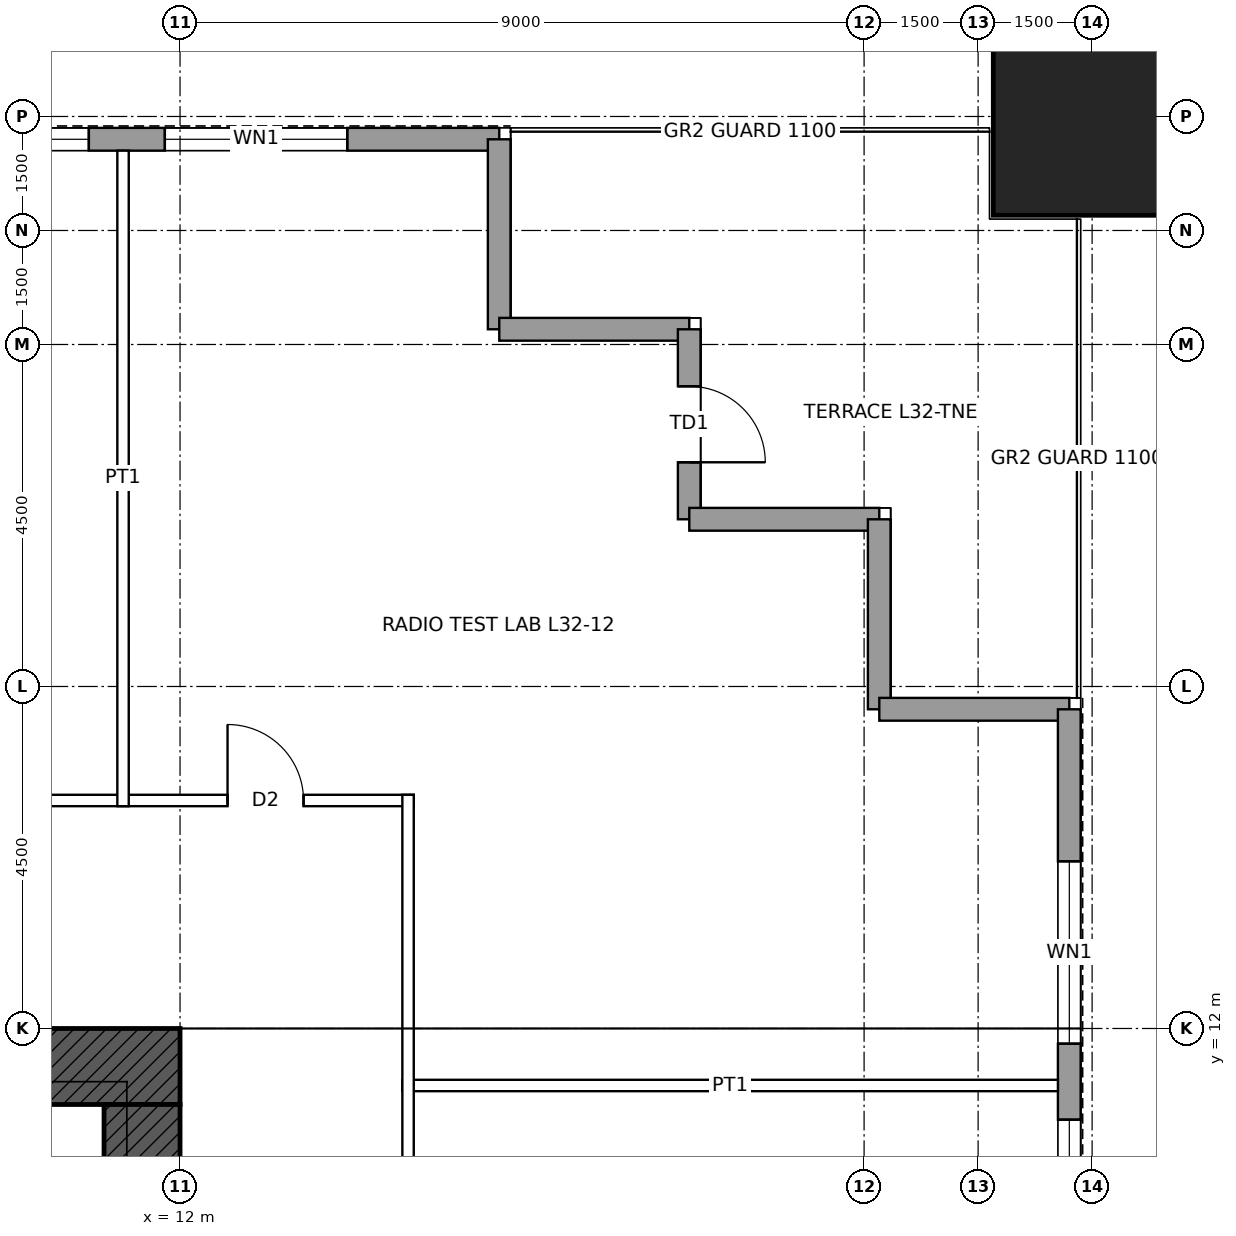
"""IFC4 building model, lengths in metres.
Left out: names, types, materials, properties, quantities, classifications, styles, units other than length and angle.
Written with IfcOpenShell. Run it as: python <this file> out.ifc"""

import sys

from ifc_helpers import new_model, si_unit, direction, frame, frame_2d, origin, origin_2d, place, context, subcontext, project, spatial, rectangle, hollow_rectangle, extrude, element, fill, save


model = new_model("IFC4")
c1 = context("Model", 3, precision=1e-05, world=origin(), true_north=direction((0.0, 1.0)))
c2 = subcontext(c1, "Body", "Model", "MODEL_VIEW")
j1 = project(units=[si_unit("LENGTHUNIT", "METRE"), si_unit("PLANEANGLEUNIT", "RADIAN")], contexts=[c1])
p1 = place(None, origin())
s1 = spatial("IfcSite", under=j1, at=p1, CompositionType="ELEMENT")
p2 = place(p1, origin())
s2 = spatial("IfcBuilding", under=s1, at=p2, CompositionType="ELEMENT")
p3 = place(p2, frame((0.0, 0.0, 158.4)))
s3 = spatial("IfcBuildingStorey", under=s2, at=p3, CompositionType="ELEMENT", Elevation=158.4)
p4 = place(p3, frame((24.0, 24.0, 0.0), z_axis=(0.0, 0.0, 1.0), x_axis=(1.0, 0.0, 0.0)))
e1 = element("IfcColumn", 1, at=p4, inside=s3, PredefinedType="COLUMN", context=c2, shape_type="SweptSolid", body=[
    extrude(hollow_rectangle(XDim=2.6, YDim=2.6, WallThickness=0.13, at=origin_2d()), origin(), (0.0, 0.0, 1.0), 4.5),
])
p5 = place(p3, frame((-12.0, 11.5, 0.0), z_axis=(0.0, 0.0, 1.0), x_axis=(1.0, 0.0, 0.0)))
e2 = element("IfcWall", 2, at=p5, inside=s3, PredefinedType="SHEAR", context=c2, shape_type="SweptSolid", body=[
    extrude(rectangle(XDim=24.0, YDim=1.0, at=frame_2d((12.0, 0.0))), origin(), (0.0, 0.0, 1.0), 4.5),
])
p6 = place(p5, frame((6.25, 0.0, 0.0)))
e3 = element("IfcOpeningElement", 3, at=p6, cuts=e2, PredefinedType="OPENING", context=c2, shape_type="SweptSolid", body=[
    extrude(rectangle(XDim=1.0, YDim=2.4, at=frame_2d((0.5, 1.2))), frame((0.0, 0.51, 0.0), z_axis=(0.0, -1.0, 0.0), x_axis=(1.0, 0.0, 0.0)), (0.0, 0.0, 1.0), 1.02),
])
p7 = place(p5, frame((16.75, 0.0, 0.0)))
e4 = element("IfcOpeningElement", 4, at=p7, cuts=e2, PredefinedType="OPENING", context=c2, shape_type="SweptSolid", body=[
    extrude(rectangle(XDim=1.0, YDim=2.4, at=frame_2d((0.5, 1.2))), frame((0.0, 0.51, 0.0), z_axis=(0.0, -1.0, 0.0), x_axis=(1.0, 0.0, 0.0)), (0.0, 0.0, 1.0), 1.02),
])
p8 = place(p3, frame((11.5, 11.0, 0.0), z_axis=(0.0, 0.0, 1.0), x_axis=(0.0, -1.0, 0.0)))
e5 = element("IfcWall", 5, at=p8, inside=s3, PredefinedType="SHEAR", context=c2, shape_type="SweptSolid", body=[
    extrude(rectangle(XDim=22.0, YDim=1.0, at=frame_2d((11.0, 0.0))), origin(), (0.0, 0.0, 1.0), 4.5),
])
p9 = place(p8, frame((10.5, 0.0, 0.0)))
e6 = element("IfcOpeningElement", 6, at=p9, cuts=e5, PredefinedType="OPENING", context=c2, shape_type="SweptSolid", body=[
    extrude(rectangle(XDim=1.0, YDim=2.4, at=frame_2d((0.5, 1.2))), frame((0.0, 0.51, 0.0), z_axis=(0.0, -1.0, 0.0), x_axis=(1.0, 0.0, 0.0)), (0.0, 0.0, 1.0), 1.02),
])
p10 = place(p3, frame((-16.2, 23.7, 0.0), z_axis=(0.0, 0.0, 1.0), x_axis=(1.0, 0.0, 0.0)))
e7 = element("IfcWall", 7, at=p10, inside=s3, PredefinedType="SOLIDWALL", context=c2, shape_type="SweptSolid", body=[
    extrude(rectangle(XDim=32.4, YDim=0.3, at=frame_2d((16.2, 0.0))), origin(), (0.0, 0.0, 1.0), 4.3),
])
p11 = place(p10, frame((2.0, 0.0, 1.0)))
e8 = element("IfcOpeningElement", 8, at=p11, cuts=e7, PredefinedType="OPENING", context=c2, shape_type="SweptSolid", body=[
    extrude(rectangle(XDim=2.4, YDim=1.2, at=frame_2d((1.2, 0.6))), frame((0.0, 0.16, 0.0), z_axis=(0.0, -1.0, 0.0), x_axis=(1.0, 0.0, 0.0)), (0.0, 0.0, 1.0), 0.32),
])
p12 = place(p10, frame((5.4, 0.0, 1.0)))
e9 = element("IfcOpeningElement", 9, at=p12, cuts=e7, PredefinedType="OPENING", context=c2, shape_type="SweptSolid", body=[
    extrude(rectangle(XDim=2.4, YDim=1.2, at=frame_2d((1.2, 0.6))), frame((0.0, 0.16, 0.0), z_axis=(0.0, -1.0, 0.0), x_axis=(1.0, 0.0, 0.0)), (0.0, 0.0, 1.0), 0.32),
])
p13 = place(p10, frame((10.45, 0.0, 1.0)))
e10 = element("IfcOpeningElement", 10, at=p13, cuts=e7, PredefinedType="OPENING", context=c2, shape_type="SweptSolid", body=[
    extrude(rectangle(XDim=2.4, YDim=1.2, at=frame_2d((1.2, 0.6))), frame((0.0, 0.16, 0.0), z_axis=(0.0, -1.0, 0.0), x_axis=(1.0, 0.0, 0.0)), (0.0, 0.0, 1.0), 0.32),
])
p14 = place(p10, frame((13.15, 0.0, 1.0)))
e11 = element("IfcOpeningElement", 11, at=p14, cuts=e7, PredefinedType="OPENING", context=c2, shape_type="SweptSolid", body=[
    extrude(rectangle(XDim=2.4, YDim=1.2, at=frame_2d((1.2, 0.6))), frame((0.0, 0.16, 0.0), z_axis=(0.0, -1.0, 0.0), x_axis=(1.0, 0.0, 0.0)), (0.0, 0.0, 1.0), 0.32),
])
p15 = place(p10, frame((16.85, 0.0, 1.0)))
e12 = element("IfcOpeningElement", 12, at=p15, cuts=e7, PredefinedType="OPENING", context=c2, shape_type="SweptSolid", body=[
    extrude(rectangle(XDim=2.4, YDim=1.2, at=frame_2d((1.2, 0.6))), frame((0.0, 0.16, 0.0), z_axis=(0.0, -1.0, 0.0), x_axis=(1.0, 0.0, 0.0)), (0.0, 0.0, 1.0), 0.32),
])
p16 = place(p10, frame((19.55, 0.0, 1.0)))
e13 = element("IfcOpeningElement", 13, at=p16, cuts=e7, PredefinedType="OPENING", context=c2, shape_type="SweptSolid", body=[
    extrude(rectangle(XDim=2.4, YDim=1.2, at=frame_2d((1.2, 0.6))), frame((0.0, 0.16, 0.0), z_axis=(0.0, -1.0, 0.0), x_axis=(1.0, 0.0, 0.0)), (0.0, 0.0, 1.0), 0.32),
])
p17 = place(p10, frame((24.6, 0.0, 1.0)))
e14 = element("IfcOpeningElement", 14, at=p17, cuts=e7, PredefinedType="OPENING", context=c2, shape_type="SweptSolid", body=[
    extrude(rectangle(XDim=2.4, YDim=1.2, at=frame_2d((1.2, 0.6))), frame((0.0, 0.16, 0.0), z_axis=(0.0, -1.0, 0.0), x_axis=(1.0, 0.0, 0.0)), (0.0, 0.0, 1.0), 0.32),
])
p18 = place(p10, frame((28.0, 0.0, 1.0)))
e15 = element("IfcOpeningElement", 15, at=p18, cuts=e7, PredefinedType="OPENING", context=c2, shape_type="SweptSolid", body=[
    extrude(rectangle(XDim=2.4, YDim=1.2, at=frame_2d((1.2, 0.6))), frame((0.0, 0.16, 0.0), z_axis=(0.0, -1.0, 0.0), x_axis=(1.0, 0.0, 0.0)), (0.0, 0.0, 1.0), 0.32),
])
for number, where, z_axis, x_axis in (
    (16, (16.2, 23.7, 0.0), (0.0, 0.0, 1.0), (0.0, -1.0, 0.0)),
    (17, (16.2, 21.2, 0.0), (0.0, 0.0, 1.0), (1.0, 0.0, 0.0)),
):
    element("IfcWall", number, at=place(p3, frame(where, z_axis=z_axis, x_axis=x_axis)), inside=s3, PredefinedType="SOLIDWALL", context=c2, shape_type="SweptSolid", body=[
        extrude(rectangle(XDim=2.5, YDim=0.3, at=frame_2d((1.25, 0.0))), origin(), (0.0, 0.0, 1.0), 4.3),
    ])
p19 = place(p3, frame((18.7, 21.2, 0.0), z_axis=(0.0, 0.0, 1.0), x_axis=(0.0, -1.0, 0.0)))
e18 = element("IfcWall", 18, at=p19, inside=s3, PredefinedType="SOLIDWALL", context=c2, shape_type="SweptSolid", body=[
    extrude(rectangle(XDim=2.5, YDim=0.3, at=frame_2d((1.25, 0.0))), origin(), (0.0, 0.0, 1.0), 4.3),
])
p20 = place(p19, frame((0.75, 0.0, 0.0)))
e19 = element("IfcOpeningElement", 19, at=p20, cuts=e18, PredefinedType="OPENING", context=c2, shape_type="SweptSolid", body=[
    extrude(rectangle(XDim=1.0, YDim=2.4, at=frame_2d((0.5, 1.2))), frame((0.0, 0.16, 0.0), z_axis=(0.0, -1.0, 0.0), x_axis=(1.0, 0.0, 0.0)), (0.0, 0.0, 1.0), 0.32),
])
for number, where, z_axis, x_axis in (
    (20, (18.7, 18.7, 0.0), (0.0, 0.0, 1.0), (1.0, 0.0, 0.0)),
    (21, (21.2, 18.7, 0.0), (0.0, 0.0, 1.0), (0.0, -1.0, 0.0)),
    (22, (21.2, 16.2, 0.0), (0.0, 0.0, 1.0), (1.0, 0.0, 0.0)),
):
    element("IfcWall", number, at=place(p3, frame(where, z_axis=z_axis, x_axis=x_axis)), inside=s3, PredefinedType="SOLIDWALL", context=c2, shape_type="SweptSolid", body=[
        extrude(rectangle(XDim=2.5, YDim=0.3, at=frame_2d((1.25, 0.0))), origin(), (0.0, 0.0, 1.0), 4.3),
    ])
p21 = place(p3, frame((23.7, 16.2, 0.0), z_axis=(0.0, 0.0, 1.0), x_axis=(0.0, -1.0, 0.0)))
e23 = element("IfcWall", 23, at=p21, inside=s3, PredefinedType="SOLIDWALL", context=c2, shape_type="SweptSolid", body=[
    extrude(rectangle(XDim=32.4, YDim=0.3, at=frame_2d((16.2, 0.0))), origin(), (0.0, 0.0, 1.0), 4.3),
])
p22 = place(p21, frame((2.0, 0.0, 1.0)))
e24 = element("IfcOpeningElement", 24, at=p22, cuts=e23, PredefinedType="OPENING", context=c2, shape_type="SweptSolid", body=[
    extrude(rectangle(XDim=2.4, YDim=1.2, at=frame_2d((1.2, 0.6))), frame((0.0, 0.16, 0.0), z_axis=(0.0, -1.0, 0.0), x_axis=(1.0, 0.0, 0.0)), (0.0, 0.0, 1.0), 0.32),
])
p23 = place(p21, frame((5.4, 0.0, 1.0)))
e25 = element("IfcOpeningElement", 25, at=p23, cuts=e23, PredefinedType="OPENING", context=c2, shape_type="SweptSolid", body=[
    extrude(rectangle(XDim=2.4, YDim=1.2, at=frame_2d((1.2, 0.6))), frame((0.0, 0.16, 0.0), z_axis=(0.0, -1.0, 0.0), x_axis=(1.0, 0.0, 0.0)), (0.0, 0.0, 1.0), 0.32),
])
p24 = place(p21, frame((10.45, 0.0, 1.0)))
e26 = element("IfcOpeningElement", 26, at=p24, cuts=e23, PredefinedType="OPENING", context=c2, shape_type="SweptSolid", body=[
    extrude(rectangle(XDim=1.8, YDim=1.2, at=frame_2d((0.9, 0.6))), frame((0.0, 0.16, 0.0), z_axis=(0.0, -1.0, 0.0), x_axis=(1.0, 0.0, 0.0)), (0.0, 0.0, 1.0), 0.32),
])
p25 = place(p21, frame((12.95, 0.0, 1.0)))
e27 = element("IfcOpeningElement", 27, at=p25, cuts=e23, PredefinedType="OPENING", context=c2, shape_type="SweptSolid", body=[
    extrude(rectangle(XDim=2.4, YDim=1.2, at=frame_2d((1.2, 0.6))), frame((0.0, 0.16, 0.0), z_axis=(0.0, -1.0, 0.0), x_axis=(1.0, 0.0, 0.0)), (0.0, 0.0, 1.0), 0.32),
])
p26 = place(p21, frame((15.65, 0.0, 1.0)))
e28 = element("IfcOpeningElement", 28, at=p26, cuts=e23, PredefinedType="OPENING", context=c2, shape_type="SweptSolid", body=[
    extrude(rectangle(XDim=1.8, YDim=1.2, at=frame_2d((0.9, 0.6))), frame((0.0, 0.16, 0.0), z_axis=(0.0, -1.0, 0.0), x_axis=(1.0, 0.0, 0.0)), (0.0, 0.0, 1.0), 0.32),
])
p27 = place(p21, frame((17.75, 0.0, 1.0)))
e29 = element("IfcOpeningElement", 29, at=p27, cuts=e23, PredefinedType="OPENING", context=c2, shape_type="SweptSolid", body=[
    extrude(rectangle(XDim=1.8, YDim=1.2, at=frame_2d((0.9, 0.6))), frame((0.0, 0.16, 0.0), z_axis=(0.0, -1.0, 0.0), x_axis=(1.0, 0.0, 0.0)), (0.0, 0.0, 1.0), 0.32),
])
p28 = place(p21, frame((24.6, 0.0, 1.0)))
e30 = element("IfcOpeningElement", 30, at=p28, cuts=e23, PredefinedType="OPENING", context=c2, shape_type="SweptSolid", body=[
    extrude(rectangle(XDim=2.4, YDim=1.2, at=frame_2d((1.2, 0.6))), frame((0.0, 0.16, 0.0), z_axis=(0.0, -1.0, 0.0), x_axis=(1.0, 0.0, 0.0)), (0.0, 0.0, 1.0), 0.32),
])
p29 = place(p21, frame((28.0, 0.0, 1.0)))
e31 = element("IfcOpeningElement", 31, at=p29, cuts=e23, PredefinedType="OPENING", context=c2, shape_type="SweptSolid", body=[
    extrude(rectangle(XDim=2.4, YDim=1.2, at=frame_2d((1.2, 0.6))), frame((0.0, 0.16, 0.0), z_axis=(0.0, -1.0, 0.0), x_axis=(1.0, 0.0, 0.0)), (0.0, 0.0, 1.0), 0.32),
])
p30 = place(p3, frame((14.925, 11.25, 0.0), z_axis=(0.0, 0.0, 1.0), x_axis=(1.0, 0.0, 0.0)))
e32 = element("IfcWall", 32, at=p30, inside=s3, PredefinedType="PARTITIONING", context=c2, shape_type="SweptSolid", body=[
    extrude(rectangle(XDim=8.625, YDim=0.15, at=frame_2d((4.312, 0.0))), origin(), (0.0, 0.0, 1.0), 3.431),
])
p31 = place(p3, frame((-15.075, 15.0, 0.0), z_axis=(0.0, 0.0, 1.0), x_axis=(1.0, 0.0, 0.0)))
e33 = element("IfcWall", 33, at=p31, inside=s3, PredefinedType="PARTITIONING", context=c2, shape_type="SweptSolid", body=[
    extrude(rectangle(XDim=30.15, YDim=0.15, at=frame_2d((15.075, 0.0))), origin(), (0.0, 0.0, 1.0), 4.3),
])
p32 = place(p31, frame((8.55, 0.0, 0.0)))
e34 = element("IfcOpeningElement", 34, at=p32, cuts=e33, PredefinedType="OPENING", context=c2, shape_type="SweptSolid", body=[
    extrude(rectangle(XDim=1.8, YDim=2.4, at=frame_2d((0.9, 1.2))), frame((0.0, 0.085, 0.0), z_axis=(0.0, -1.0, 0.0), x_axis=(1.0, 0.0, 0.0)), (0.0, 0.0, 1.0), 0.17),
])
p33 = place(p31, frame((19.8, 0.0, 0.0)))
e35 = element("IfcOpeningElement", 35, at=p33, cuts=e33, PredefinedType="OPENING", context=c2, shape_type="SweptSolid", body=[
    extrude(rectangle(XDim=1.8, YDim=2.4, at=frame_2d((0.9, 1.2))), frame((0.0, 0.085, 0.0), z_axis=(0.0, -1.0, 0.0), x_axis=(1.0, 0.0, 0.0)), (0.0, 0.0, 1.0), 0.17),
])
p34 = place(p31, frame((27.7, 0.0, 0.0)))
e36 = element("IfcOpeningElement", 36, at=p34, cuts=e33, PredefinedType="OPENING", context=c2, shape_type="SweptSolid", body=[
    extrude(rectangle(XDim=1.0, YDim=2.1, at=frame_2d((0.5, 1.05))), frame((0.0, 0.085, 0.0), z_axis=(0.0, -1.0, 0.0), x_axis=(1.0, 0.0, 0.0)), (0.0, 0.0, 1.0), 0.17),
])
p35 = place(p31, frame((1.45, 0.0, 0.0)))
e37 = element("IfcOpeningElement", 37, at=p35, cuts=e33, PredefinedType="OPENING", context=c2, shape_type="SweptSolid", body=[
    extrude(rectangle(XDim=1.0, YDim=2.1, at=frame_2d((0.5, 1.05))), frame((0.0, 0.085, 0.0), z_axis=(0.0, -1.0, 0.0), x_axis=(1.0, 0.0, 0.0)), (0.0, 0.0, 1.0), 0.17),
])
p36 = place(p3, frame((11.25, 14.925, 0.0), z_axis=(0.0, 0.0, 1.0), x_axis=(0.0, 1.0, 0.0)))
e38 = element("IfcWall", 38, at=p36, inside=s3, PredefinedType="PARTITIONING", context=c2, shape_type="SweptSolid", body=[
    extrude(rectangle(XDim=8.625, YDim=0.15, at=frame_2d((4.312, 0.0))), origin(), (0.0, 0.0, 1.0), 3.431),
])
p37 = place(p3, frame((15.0, -15.075, 0.0), z_axis=(0.0, 0.0, 1.0), x_axis=(0.0, 1.0, 0.0)))
e39 = element("IfcWall", 39, at=p37, inside=s3, PredefinedType="PARTITIONING", context=c2, shape_type="SweptSolid", body=[
    extrude(rectangle(XDim=30.15, YDim=0.15, at=frame_2d((15.075, 0.0))), origin(), (0.0, 0.0, 1.0), 4.3),
])
p38 = place(p37, frame((17.925, 0.0, 0.0)))
e40 = element("IfcOpeningElement", 40, at=p38, cuts=e39, PredefinedType="OPENING", context=c2, shape_type="SweptSolid", body=[
    extrude(rectangle(XDim=1.8, YDim=2.4, at=frame_2d((0.9, 1.2))), frame((0.0, 0.085, 0.0), z_axis=(0.0, -1.0, 0.0), x_axis=(1.0, 0.0, 0.0)), (0.0, 0.0, 1.0), 0.17),
])
p39 = place(p37, frame((6.675, 0.0, 0.0)))
e41 = element("IfcOpeningElement", 41, at=p39, cuts=e39, PredefinedType="OPENING", context=c2, shape_type="SweptSolid", body=[
    extrude(rectangle(XDim=1.8, YDim=2.4, at=frame_2d((0.9, 1.2))), frame((0.0, 0.085, 0.0), z_axis=(0.0, -1.0, 0.0), x_axis=(1.0, 0.0, 0.0)), (0.0, 0.0, 1.0), 0.17),
])
p40 = place(p17, origin())
e42 = element("IfcWindow", 42, at=p40, inside=s3, PartitioningType="SINGLE_PANEL", PredefinedType="WINDOW", context=c2, shape_type="SweptSolid", body=[
    extrude(rectangle(XDim=2.4, YDim=1.2, at=frame_2d((1.2, 0.6))), frame((0.0, 0.03, 0.0), z_axis=(0.0, -1.0, 0.0), x_axis=(1.0, 0.0, 0.0)), (0.0, 0.0, 1.0), 0.06),
])
fill(e14, e42)
p41 = place(p18, origin())
e43 = element("IfcWindow", 43, at=p41, inside=s3, PartitioningType="SINGLE_PANEL", PredefinedType="WINDOW", context=c2, shape_type="SweptSolid", body=[
    extrude(rectangle(XDim=2.4, YDim=1.2, at=frame_2d((1.2, 0.6))), frame((0.0, 0.03, 0.0), z_axis=(0.0, -1.0, 0.0), x_axis=(1.0, 0.0, 0.0)), (0.0, 0.0, 1.0), 0.06),
])
fill(e15, e43)
p42 = place(p20, origin())
e44 = element("IfcDoor", 44, at=p42, inside=s3, OperationType="SINGLE_SWING_RIGHT", PredefinedType="DOOR", context=c2, shape_type="SweptSolid", body=[
    extrude(rectangle(XDim=1.0, YDim=2.4, at=frame_2d((0.5, 1.2))), frame((0.0, 0.025, 0.0), z_axis=(0.0, -1.0, 0.0), x_axis=(1.0, 0.0, 0.0)), (0.0, 0.0, 1.0), 0.05),
])
fill(e19, e44)
p43 = place(p22, origin())
e45 = element("IfcWindow", 45, at=p43, inside=s3, PartitioningType="SINGLE_PANEL", PredefinedType="WINDOW", context=c2, shape_type="SweptSolid", body=[
    extrude(rectangle(XDim=2.4, YDim=1.2, at=frame_2d((1.2, 0.6))), frame((0.0, 0.03, 0.0), z_axis=(0.0, -1.0, 0.0), x_axis=(1.0, 0.0, 0.0)), (0.0, 0.0, 1.0), 0.06),
])
fill(e24, e45)
p44 = place(p23, origin())
e46 = element("IfcWindow", 46, at=p44, inside=s3, PartitioningType="SINGLE_PANEL", PredefinedType="WINDOW", context=c2, shape_type="SweptSolid", body=[
    extrude(rectangle(XDim=2.4, YDim=1.2, at=frame_2d((1.2, 0.6))), frame((0.0, 0.03, 0.0), z_axis=(0.0, -1.0, 0.0), x_axis=(1.0, 0.0, 0.0)), (0.0, 0.0, 1.0), 0.06),
])
fill(e25, e46)
p45 = place(p34, origin())
e47 = element("IfcDoor", 47, at=p45, inside=s3, OperationType="SINGLE_SWING_LEFT", PredefinedType="DOOR", context=c2, shape_type="SweptSolid", body=[
    extrude(rectangle(XDim=1.0, YDim=2.1, at=frame_2d((0.5, 1.05))), frame((0.0, 0.025, 0.0), z_axis=(0.0, -1.0, 0.0), x_axis=(1.0, 0.0, 0.0)), (0.0, 0.0, 1.0), 0.05),
])
fill(e36, e47)
save(model, sys.argv[1])
